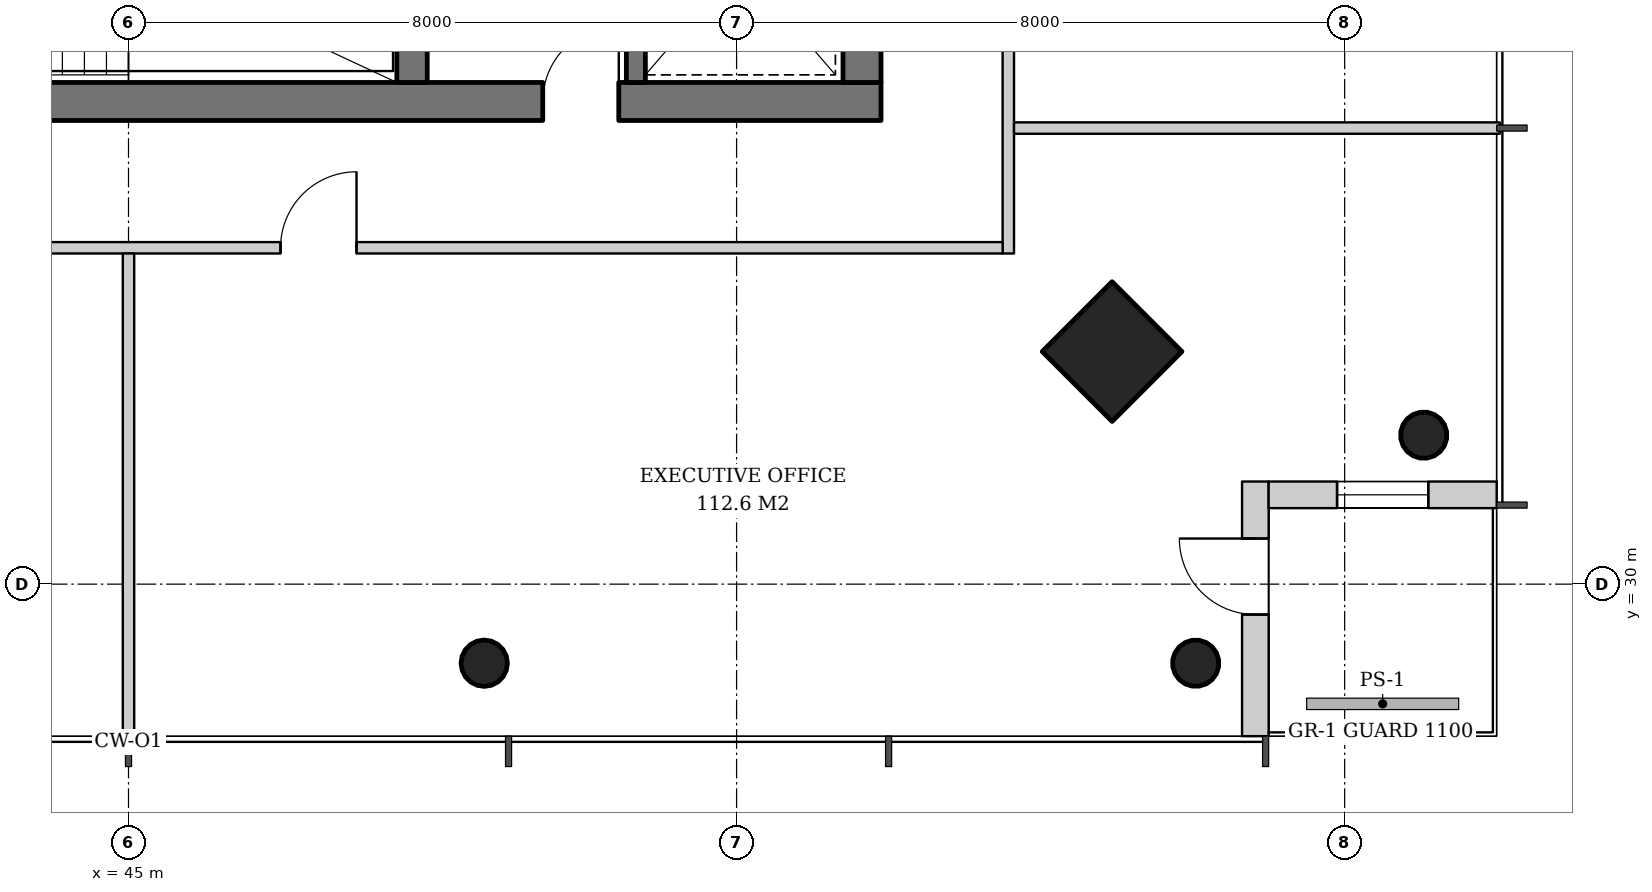
"""IFC4 building model, lengths in metres.
Left out: names, types, materials, properties, quantities, classifications, styles, units other than length and angle.
Written with IfcOpenShell. Run it as: python <this file> out.ifc"""

import sys

from ifc_helpers import new_model, si_unit, direction, frame, frame_2d, origin, origin_2d, place, context, subcontext, project, spatial, rectangle, hollow_circle, extrude, element, fill, save


model = new_model("IFC4")
c1 = context("Model", 3, precision=1e-05, world=origin(), true_north=direction((0.0, 1.0)))
c2 = subcontext(c1, "Body", "Model", "MODEL_VIEW")
j1 = project(units=[si_unit("LENGTHUNIT", "METRE"), si_unit("PLANEANGLEUNIT", "RADIAN")], contexts=[c1])
p1 = place(None, origin())
s1 = spatial("IfcSite", under=j1, at=p1, CompositionType="ELEMENT")
p2 = place(p1, origin())
s2 = spatial("IfcBuilding", under=s1, at=p2, CompositionType="ELEMENT")
p3 = place(p2, frame((0.0, 0.0, 237.6)))
s3 = spatial("IfcBuildingStorey", under=s2, at=p3, CompositionType="ELEMENT", Elevation=237.6)
p4 = place(p3, frame((62.079, 31.921, 0.0), z_axis=(-0.031964207655, 0.031964207655, 0.998977766949), x_axis=(-0.707106781187, -0.707106781187, 0.0)))
e1 = element("IfcColumn", 1, at=p4, inside=s3, PredefinedType="COLUMN", context=c2, shape_type="SweptSolid", body=[
    extrude(hollow_circle(Radius=0.305, WallThickness=0.025, at=origin_2d()), origin(), (0.0, 0.0, 1.0), 3.804),
])
p5 = place(p3, frame((57.979, 33.021, 0.0), z_axis=(-0.031900153262, 0.031900153262, 0.998981861919), x_axis=(-0.707106781187, -0.707106781187, 0.0)))
e2 = element("IfcColumn", 2, at=p5, inside=s3, PredefinedType="COLUMN", context=c2, shape_type="SweptSolid", body=[
    extrude(rectangle(XDim=1.3, YDim=1.3, at=origin_2d()), origin(), (0.0, 0.0, 1.0), 3.804),
])
p6 = place(p3, frame((59.079, 28.921, 0.0), z_axis=(-0.031964207655, 0.031964207655, 0.998977766949), x_axis=(-0.707106781187, -0.707106781187, 0.0)))
e3 = element("IfcColumn", 3, at=p6, inside=s3, PredefinedType="COLUMN", context=c2, shape_type="SweptSolid", body=[
    extrude(hollow_circle(Radius=0.305, WallThickness=0.025, at=origin_2d()), origin(), (0.0, 0.0, 1.0), 3.804),
])
p7 = place(p3, frame((49.693, 28.921, 0.0), z_axis=(-0.01065957743, 0.031978732291, 0.999431705566), x_axis=(-0.948683298051, -0.316227766017, 0.0)))
e4 = element("IfcColumn", 4, at=p7, inside=s3, PredefinedType="COLUMN", context=c2, shape_type="SweptSolid", body=[
    extrude(hollow_circle(Radius=0.305, WallThickness=0.025, at=origin_2d()), origin(), (0.0, 0.0, 1.0), 3.802),
])
p8 = place(p3, frame((35.1, 36.35, 0.0), z_axis=(0.0, 0.0, 1.0), x_axis=(1.0, 0.0, 0.0)))
e5 = element("IfcWall", 5, at=p8, inside=s3, PredefinedType="SHEAR", context=c2, shape_type="SweptSolid", body=[
    extrude(rectangle(XDim=19.8, YDim=0.5, at=frame_2d((9.9, 0.0))), origin(), (0.0, 0.0, 1.0), 3.8),
])
p9 = place(p8, frame((3.9, 0.0, 0.0)))
e6 = element("IfcOpeningElement", 6, at=p9, cuts=e5, PredefinedType="OPENING", context=c2, shape_type="SweptSolid", body=[
    extrude(rectangle(XDim=1.0, YDim=2.1, at=frame_2d((0.5, 1.05))), frame((0.0, 0.26, 0.0), z_axis=(0.0, -1.0, 0.0), x_axis=(1.0, 0.0, 0.0)), (0.0, 0.0, 1.0), 0.52),
])
p10 = place(p8, frame((15.35, 0.0, 0.0)))
e7 = element("IfcOpeningElement", 7, at=p10, cuts=e5, PredefinedType="OPENING", context=c2, shape_type="SweptSolid", body=[
    extrude(rectangle(XDim=1.0, YDim=2.1, at=frame_2d((0.5, 1.05))), frame((0.0, 0.26, 0.0), z_axis=(0.0, -1.0, 0.0), x_axis=(1.0, 0.0, 0.0)), (0.0, 0.0, 1.0), 0.52),
])
p11 = place(p3, frame((54.65, 36.6, 0.0), z_axis=(0.0, 0.0, 1.0), x_axis=(0.0, 1.0, 0.0)))
e8 = element("IfcWall", 8, at=p11, inside=s3, PredefinedType="SHEAR", context=c2, shape_type="SweptSolid", body=[
    extrude(rectangle(XDim=18.8, YDim=0.5, at=frame_2d((9.4, 0.0))), origin(), (0.0, 0.0, 1.0), 3.8),
])
p12 = place(p11, frame((8.5, 0.0, 0.0)))
e9 = element("IfcOpeningElement", 9, at=p12, cuts=e8, PredefinedType="OPENING", context=c2, shape_type="SweptSolid", body=[
    extrude(rectangle(XDim=1.8, YDim=2.4, at=frame_2d((0.9, 1.2))), frame((0.0, 0.26, 0.0), z_axis=(0.0, -1.0, 0.0), x_axis=(1.0, 0.0, 0.0)), (0.0, 0.0, 1.0), 0.52),
])
p13 = place(p3, frame((48.73, 36.6, 0.0), z_axis=(0.0, 0.0, 1.0), x_axis=(0.0, 1.0, 0.0)))
e10 = element("IfcWall", 10, at=p13, inside=s3, PredefinedType="SHEAR", context=c2, shape_type="SweptSolid", body=[
    extrude(rectangle(XDim=3.0, YDim=0.4, at=frame_2d((1.5, 0.0))), origin(), (0.0, 0.0, 1.0), 3.8),
])
p14 = place(p3, frame((59.825, 28.0, 0.0), z_axis=(0.0, 0.0, 1.0), x_axis=(0.0, 1.0, 0.0)))
e11 = element("IfcWall", 11, at=p14, inside=s3, PredefinedType="SOLIDWALL", context=c2, shape_type="SweptSolid", body=[
    extrude(rectangle(XDim=3.35, YDim=0.35, at=frame_2d((1.675, 0.0))), origin(), (0.0, 0.0, 1.0), 3.62),
])
p15 = place(p14, frame((1.6, 0.0, 0.0)))
e12 = element("IfcOpeningElement", 12, at=p15, cuts=e11, PredefinedType="OPENING", context=c2, shape_type="SweptSolid", body=[
    extrude(rectangle(XDim=1.0, YDim=2.4, at=frame_2d((0.5, 1.2))), frame((0.0, 0.185, 0.0), z_axis=(0.0, -1.0, 0.0), x_axis=(1.0, 0.0, 0.0)), (0.0, 0.0, 1.0), 0.37),
])
p16 = place(p3, frame((60.0, 31.175, 0.0), z_axis=(0.0, 0.0, 1.0), x_axis=(1.0, 0.0, 0.0)))
e13 = element("IfcWall", 13, at=p16, inside=s3, PredefinedType="SOLIDWALL", context=c2, shape_type="SweptSolid", body=[
    extrude(rectangle(XDim=3.0, YDim=0.35, at=frame_2d((1.5, 0.0))), origin(), (0.0, 0.0, 1.0), 3.62),
])
p17 = place(p16, frame((0.9, 0.0, 0.6)))
e14 = element("IfcOpeningElement", 14, at=p17, cuts=e13, PredefinedType="OPENING", context=c2, shape_type="SweptSolid", body=[
    extrude(rectangle(XDim=1.2, YDim=2.55, at=frame_2d((0.6, 1.275))), frame((0.0, 0.185, 0.0), z_axis=(0.0, -1.0, 0.0), x_axis=(1.0, 0.0, 0.0)), (0.0, 0.0, 1.0), 0.37),
])
p18 = place(p3, frame((51.675, 36.6, 0.0), z_axis=(0.0, 0.0, 1.0), x_axis=(0.0, 1.0, 0.0)))
e15 = element("IfcWall", 15, at=p18, inside=s3, PredefinedType="SHEAR", context=c2, shape_type="SweptSolid", body=[
    extrude(rectangle(XDim=3.0, YDim=0.25, at=frame_2d((1.5, 0.0))), origin(), (0.0, 0.0, 1.0), 3.8),
])
p19 = place(p18, frame((0.85, 0.0, 0.0)))
e16 = element("IfcOpeningElement", 16, at=p19, cuts=e15, PredefinedType="OPENING", context=c2, shape_type="SweptSolid", body=[
    extrude(rectangle(XDim=1.4, YDim=2.4, at=frame_2d((0.7, 1.2))), frame((0.0, 0.135, 0.0), z_axis=(0.0, -1.0, 0.0), x_axis=(1.0, 0.0, 0.0)), (0.0, 0.0, 1.0), 0.27),
])
p20 = place(p3, frame((56.575, 34.35, 0.0), z_axis=(0.0, 0.0, 1.0), x_axis=(0.0, 1.0, 0.0)))
e17 = element("IfcWall", 17, at=p20, inside=s3, PredefinedType="PARTITIONING", context=c2, shape_type="SweptSolid", body=[
    extrude(rectangle(XDim=23.15, YDim=0.15, at=frame_2d((11.575, 0.0))), origin(), (0.0, 0.0, 1.0), 3.02),
])
p21 = place(p20, frame((3.65, 0.0, 0.0)))
e18 = element("IfcOpeningElement", 18, at=p21, cuts=e17, PredefinedType="OPENING", context=c2, shape_type="SweptSolid", body=[
    extrude(rectangle(XDim=1.0, YDim=2.1, at=frame_2d((0.5, 1.05))), frame((0.0, 0.085, 0.0), z_axis=(0.0, -1.0, 0.0), x_axis=(1.0, 0.0, 0.0)), (0.0, 0.0, 1.0), 0.17),
])
p22 = place(p20, frame((8.65, 0.0, 0.0)))
e19 = element("IfcOpeningElement", 19, at=p22, cuts=e17, PredefinedType="OPENING", context=c2, shape_type="SweptSolid", body=[
    extrude(rectangle(XDim=1.0, YDim=2.1, at=frame_2d((0.5, 1.05))), frame((0.0, 0.085, 0.0), z_axis=(0.0, -1.0, 0.0), x_axis=(1.0, 0.0, 0.0)), (0.0, 0.0, 1.0), 0.17),
])
p23 = place(p20, frame((18.65, 0.0, 0.0)))
e20 = element("IfcOpeningElement", 20, at=p23, cuts=e17, PredefinedType="OPENING", context=c2, shape_type="SweptSolid", body=[
    extrude(rectangle(XDim=1.0, YDim=2.1, at=frame_2d((0.5, 1.05))), frame((0.0, 0.085, 0.0), z_axis=(0.0, -1.0, 0.0), x_axis=(1.0, 0.0, 0.0)), (0.0, 0.0, 1.0), 0.17),
])
p24 = place(p3, frame((56.65, 36.0, 0.0), z_axis=(0.0, 0.0, 1.0), x_axis=(1.0, 0.0, 0.0)))
e21 = element("IfcWall", 21, at=p24, inside=s3, PredefinedType="PARTITIONING", context=c2, shape_type="SweptSolid", body=[
    extrude(rectangle(XDim=6.39, YDim=0.15, at=frame_2d((3.195, 0.0))), origin(), (0.0, 0.0, 1.0), 3.12),
])
p25 = place(p3, frame((33.35, 34.425, 0.0), z_axis=(0.0, 0.0, 1.0), x_axis=(1.0, 0.0, 0.0)))
e22 = element("IfcWall", 22, at=p25, inside=s3, PredefinedType="PARTITIONING", context=c2, shape_type="SweptSolid", body=[
    extrude(rectangle(XDim=23.15, YDim=0.15, at=frame_2d((11.575, 0.0))), origin(), (0.0, 0.0, 1.0), 3.02),
])
p26 = place(p25, frame((3.65, 0.0, 0.0)))
e23 = element("IfcOpeningElement", 23, at=p26, cuts=e22, PredefinedType="OPENING", context=c2, shape_type="SweptSolid", body=[
    extrude(rectangle(XDim=1.0, YDim=2.1, at=frame_2d((0.5, 1.05))), frame((0.0, 0.085, 0.0), z_axis=(0.0, -1.0, 0.0), x_axis=(1.0, 0.0, 0.0)), (0.0, 0.0, 1.0), 0.17),
])
p27 = place(p25, frame((8.65, 0.0, 0.0)))
e24 = element("IfcOpeningElement", 24, at=p27, cuts=e22, PredefinedType="OPENING", context=c2, shape_type="SweptSolid", body=[
    extrude(rectangle(XDim=1.0, YDim=2.1, at=frame_2d((0.5, 1.05))), frame((0.0, 0.085, 0.0), z_axis=(0.0, -1.0, 0.0), x_axis=(1.0, 0.0, 0.0)), (0.0, 0.0, 1.0), 0.17),
])
p28 = place(p25, frame((13.65, 0.0, 0.0)))
e25 = element("IfcOpeningElement", 25, at=p28, cuts=e22, PredefinedType="OPENING", context=c2, shape_type="SweptSolid", body=[
    extrude(rectangle(XDim=1.0, YDim=2.1, at=frame_2d((0.5, 1.05))), frame((0.0, 0.085, 0.0), z_axis=(0.0, -1.0, 0.0), x_axis=(1.0, 0.0, 0.0)), (0.0, 0.0, 1.0), 0.17),
])
p29 = place(p3, frame((45.0, 34.35, 0.0), z_axis=(0.0, 0.0, 1.0), x_axis=(0.0, -1.0, 0.0)))
e26 = element("IfcWall", 26, at=p29, inside=s3, PredefinedType="PARTITIONING", context=c2, shape_type="SweptSolid", body=[
    extrude(rectangle(XDim=6.39, YDim=0.15, at=frame_2d((3.195, 0.0))), origin(), (0.0, 0.0, 1.0), 3.12),
])
p30 = place(p15, origin())
e27 = element("IfcDoor", 27, at=p30, inside=s3, OperationType="SINGLE_SWING_RIGHT", PredefinedType="DOOR", context=c2, shape_type="SweptSolid", body=[
    extrude(rectangle(XDim=1.0, YDim=2.4, at=frame_2d((0.5, 1.2))), frame((0.0, 0.025, 0.0), z_axis=(0.0, -1.0, 0.0), x_axis=(1.0, 0.0, 0.0)), (0.0, 0.0, 1.0), 0.05),
])
fill(e12, e27)
p31 = place(p17, origin())
e28 = element("IfcWindow", 28, at=p31, inside=s3, PartitioningType="SINGLE_PANEL", PredefinedType="WINDOW", context=c2, shape_type="SweptSolid", body=[
    extrude(rectangle(XDim=1.2, YDim=2.55, at=frame_2d((0.6, 1.275))), frame((0.0, 0.03, 0.0), z_axis=(0.0, -1.0, 0.0), x_axis=(1.0, 0.0, 0.0)), (0.0, 0.0, 1.0), 0.06),
])
fill(e14, e28)
p32 = place(p10, origin())
e29 = element("IfcDoor", 29, at=p32, inside=s3, OperationType="SINGLE_SWING_RIGHT", PredefinedType="DOOR", context=c2, shape_type="SweptSolid", body=[
    extrude(rectangle(XDim=1.0, YDim=2.1, at=frame_2d((0.5, 1.05))), frame((0.0, 0.025, 0.0), z_axis=(0.0, -1.0, 0.0), x_axis=(1.0, 0.0, 0.0)), (0.0, 0.0, 1.0), 0.05),
])
fill(e7, e29)
p33 = place(p28, origin())
e30 = element("IfcDoor", 30, at=p33, inside=s3, OperationType="SINGLE_SWING_RIGHT", PredefinedType="DOOR", context=c2, shape_type="SweptSolid", body=[
    extrude(rectangle(XDim=1.0, YDim=2.1, at=frame_2d((0.5, 1.05))), frame((0.0, 0.025, 0.0), z_axis=(0.0, -1.0, 0.0), x_axis=(1.0, 0.0, 0.0)), (0.0, 0.0, 1.0), 0.05),
])
fill(e25, e30)
save(model, sys.argv[1])
